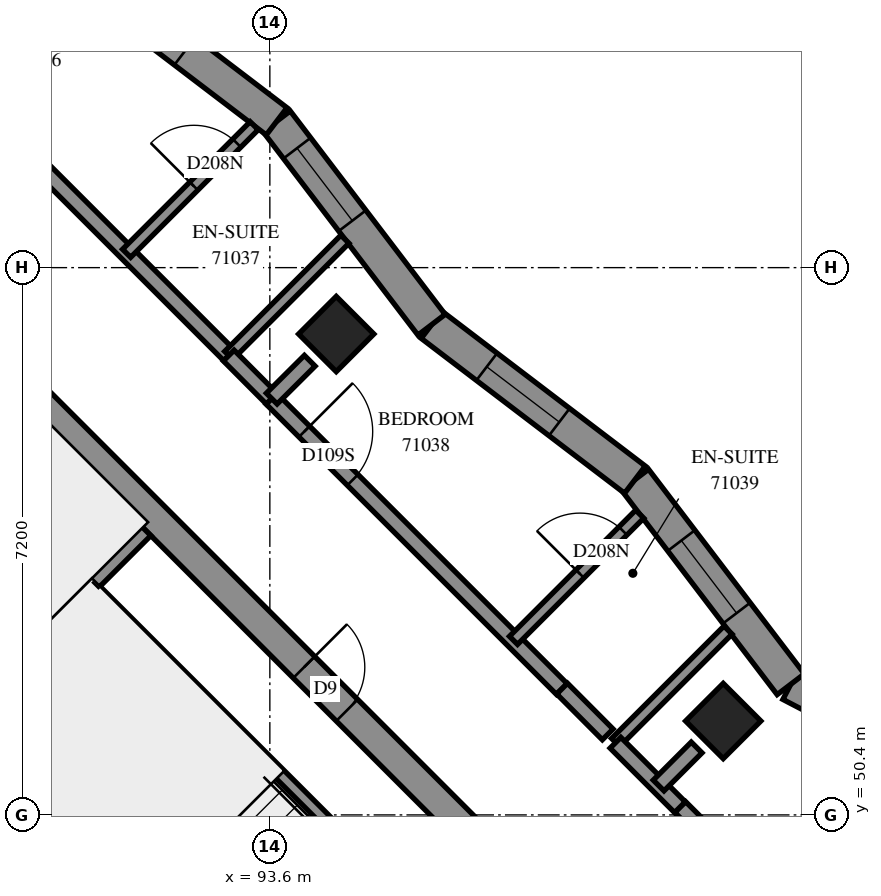
"""IFC4 building model, lengths in metres.
Left out: names, types, materials, properties, quantities, classifications, styles, units other than length and angle.
Written with IfcOpenShell. Run it as: python <this file> out.ifc"""

import sys

from ifc_helpers import new_model, si_unit, direction, frame, frame_2d, origin, origin_2d, place, context, subcontext, project, spatial, polyline, rectangle, outline, extrude, element, fill, save


model = new_model("IFC4")
c1 = context("Model", 3, precision=1e-05, world=origin(), true_north=direction((0.0, 1.0)))
c2 = subcontext(c1, "Body", "Model", "MODEL_VIEW")
j1 = project(units=[si_unit("LENGTHUNIT", "METRE"), si_unit("PLANEANGLEUNIT", "RADIAN")], contexts=[c1])
p1 = place(None, origin())
s1 = spatial("IfcSite", under=j1, at=p1, CompositionType="ELEMENT")
p2 = place(p1, origin())
s2 = spatial("IfcBuilding", under=s1, at=p2, CompositionType="ELEMENT")
p3 = place(p2, frame((0.0, 0.0, 260.8)))
s3 = spatial("IfcBuildingStorey", under=s2, at=p3, CompositionType="ELEMENT", Elevation=260.8)
for number, where, z_axis, x_axis in (
    (1, (94.474, 56.727, 0.0), (0.0, 0.0, 1.0), (0.707, -0.707, 0.0)),
    (2, (99.565, 51.635, 0.0), (0.0, 0.0, 1.0), (0.707, -0.707, 0.0)),
):
    element("IfcColumn", number, at=place(p3, frame(where, z_axis=z_axis, x_axis=x_axis)), inside=s3, PredefinedType="COLUMN", context=c2, shape_type="SweptSolid", body=[
        extrude(rectangle(XDim=0.7, YDim=0.7, at=origin_2d()), origin(), (0.0, 0.0, 1.0), 3.1),
    ])
p4 = place(p3, frame((86.695, 59.696, -0.3), z_axis=(0.0, 0.0, 1.0), x_axis=(0.7071100706, -0.7071034917, 0.0)))
e3 = element("IfcWall", 3, at=p4, inside=s3, PredefinedType="SHEAR", context=c2, shape_type="SweptSolid", body=[
    extrude(rectangle(XDim=15.2, YDim=0.4, at=frame_2d((7.6, 0.0))), origin(), (0.0, 0.0, 1.0), 2.7),
])
p5 = place(p4, frame((10.4, 0.0, 0.3)))
e4 = element("IfcOpeningElement", 4, at=p5, cuts=e3, PredefinedType="OPENING", context=c2, shape_type="SweptSolid", body=[
    extrude(rectangle(XDim=0.8, YDim=2.1, at=frame_2d((0.4, 1.05))), frame((0.0, 0.21, 0.0), z_axis=(0.0, -1.0, 0.0), x_axis=(1.0, 0.0, 0.0)), (0.0, 0.0, 1.0), 0.42),
])
p6 = place(p3, frame((81.534, 53.969, 0.0), z_axis=(0.0, 0.0, 1.0), x_axis=(0.707103309, -0.7071102534, 0.0)))
e5 = element("IfcWall", 5, at=p6, inside=s3, PredefinedType="SOLIDWALL", context=c2, shape_type="SweptSolid", body=[
    extrude(rectangle(XDim=14.4, YDim=0.3, at=frame_2d((7.2, 0.0))), origin(), (0.0, 0.0, 1.0), 3.1),
])
p7 = place(p6, frame((8.55, 0.0, 0.0)))
e6 = element("IfcOpeningElement", 6, at=p7, cuts=e5, PredefinedType="OPENING", context=c2, shape_type="SweptSolid", body=[
    extrude(rectangle(XDim=0.9, YDim=2.1, at=frame_2d((0.45, 1.05))), frame((0.0, 0.16, 0.0), z_axis=(0.0, -1.0, 0.0), x_axis=(1.0, 0.0, 0.0)), (0.0, 0.0, 1.0), 0.32),
])
p8 = place(p6, frame((1.25, 0.0, 0.0)))
e7 = element("IfcOpeningElement", 7, at=p8, cuts=e5, PredefinedType="OPENING", context=c2, shape_type="SweptSolid", body=[
    extrude(rectangle(XDim=1.1, YDim=2.1, at=frame_2d((0.55, 1.05))), frame((0.0, 0.16, 0.0), z_axis=(0.0, -1.0, 0.0), x_axis=(1.0, 0.0, 0.0)), (0.0, 0.0, 1.0), 0.32),
])
p9 = place(p6, frame((4.85, 0.0, 0.0)))
e8 = element("IfcOpeningElement", 8, at=p9, cuts=e5, PredefinedType="OPENING", context=c2, shape_type="SweptSolid", body=[
    extrude(rectangle(XDim=1.1, YDim=2.1, at=frame_2d((0.55, 1.05))), frame((0.0, 0.16, 0.0), z_axis=(0.0, -1.0, 0.0), x_axis=(1.0, 0.0, 0.0)), (0.0, 0.0, 1.0), 0.32),
])
p10 = place(p6, frame((12.05, 0.0, 0.0)))
e9 = element("IfcOpeningElement", 9, at=p10, cuts=e5, PredefinedType="OPENING", context=c2, shape_type="SweptSolid", body=[
    extrude(rectangle(XDim=1.1, YDim=2.1, at=frame_2d((0.55, 1.05))), frame((0.0, 0.16, 0.0), z_axis=(0.0, -1.0, 0.0), x_axis=(1.0, 0.0, 0.0)), (0.0, 0.0, 1.0), 0.32),
])
p11 = place(p3, frame((88.958, 51.211, 0.0), z_axis=(0.0, 0.0, 1.0), x_axis=(0.7070998367, -0.7071137256, 0.0)))
e10 = element("IfcWall", 10, at=p11, inside=s3, PredefinedType="SOLIDWALL", context=c2, shape_type="SweptSolid", body=[
    extrude(rectangle(XDim=7.2, YDim=0.3, at=frame_2d((3.6, 0.0))), origin(), (0.0, 0.0, 1.0), 3.1),
])
p12 = place(p3, frame((88.958, 51.211, 0.0), z_axis=(0.0, 0.0, 1.0), x_axis=(0.7071067812, 0.7071067812, 0.0)))
e11 = element("IfcWall", 11, at=p12, inside=s3, PredefinedType="SOLIDWALL", context=c2, shape_type="SweptSolid", body=[
    extrude(rectangle(XDim=4.2, YDim=0.3, at=frame_2d((2.1, 0.0))), origin(), (0.0, 0.0, 1.0), 3.1),
])
p13 = place(p3, frame((99.246, 46.544, 0.0), z_axis=(0.0, 0.0, 1.0), x_axis=(0.7071067812, 0.7071067812, 0.0)))
e12 = element("IfcWall", 12, at=p13, inside=s3, PredefinedType="SOLIDWALL", context=c2, shape_type="SweptSolid", body=[
    extrude(outline(polyline([(0.225, -0.225), (6.076, -0.225), (5.462, 0.225), (-0.225, 0.225), (0.225, -0.225)])), origin(), (0.0, 0.0, 1.0), 3.1),
])
p14 = place(p13, frame((0.713, 0.0, 0.6)))
e13 = element("IfcOpeningElement", 13, at=p14, cuts=e12, PredefinedType="OPENING", context=c2, shape_type="SweptSolid", body=[
    extrude(rectangle(XDim=1.8, YDim=1.9, at=frame_2d((0.9, 0.95))), frame((0.0, 0.235, 0.0), z_axis=(0.0, -1.0, 0.0), x_axis=(1.0, 0.0, 0.0)), (0.0, 0.0, 1.0), 0.47),
])
p15 = place(p13, frame((3.944, 0.0, 0.6)))
e14 = element("IfcOpeningElement", 14, at=p15, cuts=e12, PredefinedType="OPENING", context=c2, shape_type="SweptSolid", body=[
    extrude(rectangle(XDim=1.2, YDim=1.9, at=frame_2d((0.6, 0.95))), frame((0.0, 0.235, 0.0), z_axis=(0.0, -1.0, 0.0), x_axis=(1.0, 0.0, 0.0)), (0.0, 0.0, 1.0), 0.47),
])
p16 = place(p3, frame((103.326, 50.624, 0.0), z_axis=(0.0, 0.0, 1.0), x_axis=(-0.8870210657, 0.4617289562, 0.0)))
e15 = element("IfcWall", 15, at=p16, inside=s3, PredefinedType="SOLIDWALL", context=c2, shape_type="SweptSolid", body=[
    extrude(outline(polyline([(-0.307, -0.225), (3.188, -0.225), (3.289, 0.225), (0.307, 0.225), (-0.307, -0.225)])), origin(), (0.0, 0.0, 1.0), 3.1),
])
p17 = place(p16, frame((1.173, 0.0, 0.45)))
e16 = element("IfcOpeningElement", 16, at=p17, cuts=e15, PredefinedType="OPENING", context=c2, shape_type="SweptSolid", body=[
    extrude(rectangle(XDim=1.2, YDim=2.55, at=frame_2d((0.6, 1.275))), frame((0.0, 0.235, 0.0), z_axis=(0.0, -1.0, 0.0), x_axis=(1.0, 0.0, 0.0)), (0.0, 0.0, 1.0), 0.47),
])
p18 = place(p3, frame((100.453, 52.119, 0.0), z_axis=(0.0, 0.0, 1.0), x_axis=(-0.6058900407, 0.7955484012, 0.0)))
e17 = element("IfcWall", 17, at=p18, inside=s3, PredefinedType="SOLIDWALL", context=c2, shape_type="SweptSolid", body=[
    extrude(outline(polyline([(0.05, -0.225), (3.414, -0.225), (3.353, 0.225), (-0.05, 0.225), (0.05, -0.225)])), origin(), (0.0, 0.0, 1.0), 3.1),
])
p19 = place(p18, frame((1.177, 0.0, 0.45)))
e18 = element("IfcOpeningElement", 18, at=p19, cuts=e17, PredefinedType="OPENING", context=c2, shape_type="SweptSolid", body=[
    extrude(rectangle(XDim=1.2, YDim=2.55, at=frame_2d((0.6, 1.275))), frame((0.0, 0.235, 0.0), z_axis=(0.0, -1.0, 0.0), x_axis=(1.0, 0.0, 0.0)), (0.0, 0.0, 1.0), 0.47),
])
p20 = place(p3, frame((98.403, 54.811, 0.0), z_axis=(0.0, 0.0, 1.0), x_axis=(-0.795543631, 0.605896304, 0.0)))
e19 = element("IfcWall", 19, at=p20, inside=s3, PredefinedType="SOLIDWALL", context=c2, shape_type="SweptSolid", body=[
    extrude(outline(polyline([(-0.03, -0.225), (3.333, -0.225), (3.394, 0.225), (0.03, 0.225), (-0.03, -0.225)])), origin(), (0.0, 0.0, 1.0), 3.1),
])
p21 = place(p20, frame((1.251, 0.0, 0.45)))
e20 = element("IfcOpeningElement", 20, at=p21, cuts=e19, PredefinedType="OPENING", context=c2, shape_type="SweptSolid", body=[
    extrude(rectangle(XDim=1.2, YDim=2.55, at=frame_2d((0.6, 1.275))), frame((0.0, 0.235, 0.0), z_axis=(0.0, -1.0, 0.0), x_axis=(1.0, 0.0, 0.0)), (0.0, 0.0, 1.0), 0.47),
])
p22 = place(p3, frame((95.727, 56.849, 0.0), z_axis=(0.0, 0.0, 1.0), x_axis=(-0.6059151193, 0.7955293007, 0.0)))
e21 = element("IfcWall", 21, at=p22, inside=s3, PredefinedType="SOLIDWALL", context=c2, shape_type="SweptSolid", body=[
    extrude(outline(polyline([(0.03, -0.225), (3.394, -0.225), (3.333, 0.225), (-0.03, 0.225), (0.03, -0.225)])), origin(), (0.0, 0.0, 1.0), 3.1),
])
p23 = place(p22, frame((1.72, 0.0, 0.45)))
e22 = element("IfcOpeningElement", 22, at=p23, cuts=e21, PredefinedType="OPENING", context=c2, shape_type="SweptSolid", body=[
    extrude(rectangle(XDim=1.2, YDim=2.55, at=frame_2d((0.6, 1.275))), frame((0.0, 0.235, 0.0), z_axis=(0.0, -1.0, 0.0), x_axis=(1.0, 0.0, 0.0)), (0.0, 0.0, 1.0), 0.47),
])
p24 = place(p3, frame((93.689, 59.525, 0.0), z_axis=(0.0, 0.0, 1.0), x_axis=(-0.7955327164, 0.6059106346, 0.0)))
e23 = element("IfcWall", 23, at=p24, inside=s3, PredefinedType="SOLIDWALL", context=c2, shape_type="SweptSolid", body=[
    extrude(outline(polyline([(-0.03, -0.225), (3.333, -0.225), (3.394, 0.225), (0.03, 0.225), (-0.03, -0.225)])), origin(), (0.0, 0.0, 1.0), 3.1),
])
p25 = place(p24, frame((1.52, 0.0, 0.45)))
e24 = element("IfcOpeningElement", 24, at=p25, cuts=e23, PredefinedType="OPENING", context=c2, shape_type="SweptSolid", body=[
    extrude(rectangle(XDim=1.2, YDim=2.55, at=frame_2d((0.6, 1.275))), frame((0.0, 0.235, 0.0), z_axis=(0.0, -1.0, 0.0), x_axis=(1.0, 0.0, 0.0)), (0.0, 0.0, 1.0), 0.47),
])
p26 = place(p3, frame((91.313, 53.354, 0.0), z_axis=(0.0, 0.0, 1.0), x_axis=(0.7071140275, -0.7070995348, 0.0)))
e25 = element("IfcWall", 25, at=p26, inside=s3, PredefinedType="PARTITIONING", context=c2, shape_type="SweptSolid", body=[
    extrude(rectangle(XDim=6.9, YDim=0.15, at=frame_2d((3.45, 0.0))), origin(), (0.0, 0.0, 1.0), 3.1),
])
p27 = place(p3, frame((88.537, 60.973, 0.0), z_axis=(0.0, 0.0, 1.0), x_axis=(0.7071067812, -0.7071067812, 0.0)))
e26 = element("IfcWall", 26, at=p27, inside=s3, PredefinedType="PARTITIONING", context=c2, shape_type="SweptSolid", body=[
    extrude(rectangle(XDim=6.401, YDim=0.2, at=frame_2d((3.2, 0.0))), origin(), (0.0, 0.0, 1.0), 3.1),
])
p28 = place(p27, frame((0.569, 0.0, 0.0)))
e27 = element("IfcOpeningElement", 27, at=p28, cuts=e26, PredefinedType="OPENING", context=c2, shape_type="SweptSolid", body=[
    extrude(rectangle(XDim=0.9, YDim=2.1, at=frame_2d((0.45, 1.05))), frame((0.0, 0.11, 0.0), z_axis=(0.0, -1.0, 0.0), x_axis=(1.0, 0.0, 0.0)), (0.0, 0.0, 1.0), 0.22),
])
p29 = place(p3, frame((93.621, 55.875, 0.0), z_axis=(0.0, 0.0, 1.0), x_axis=(0.7071623255, -0.7070512325, 0.0)))
e28 = element("IfcWall", 28, at=p29, inside=s3, PredefinedType="PARTITIONING", context=c2, shape_type="SweptSolid", body=[
    extrude(rectangle(XDim=5.401, YDim=0.2, at=frame_2d((2.7, 0.0))), origin(), (0.0, 0.0, 1.0), 3.1),
])
p30 = place(p29, frame((0.611, 0.0, 0.0)))
e29 = element("IfcOpeningElement", 29, at=p30, cuts=e28, PredefinedType="OPENING", context=c2, shape_type="SweptSolid", body=[
    extrude(rectangle(XDim=0.9, YDim=2.1, at=frame_2d((0.45, 1.05))), frame((0.0, 0.11, 0.0), z_axis=(0.0, -1.0, 0.0), x_axis=(1.0, 0.0, 0.0)), (0.0, 0.0, 1.0), 0.22),
])
p31 = place(p3, frame((91.716, 57.788, 0.0), z_axis=(0.0, 0.0, 1.0), x_axis=(0.7071067812, 0.7071067812, 0.0)))
e30 = element("IfcWall", 30, at=p31, inside=s3, PredefinedType="PARTITIONING", context=c2, shape_type="SweptSolid", body=[
    extrude(rectangle(XDim=2.373, YDim=0.15, at=frame_2d((1.187, 0.0))), origin(), (0.0, 0.0, 1.0), 3.1),
])
p32 = place(p31, frame((1.25, 0.0, 0.0)))
e31 = element("IfcOpeningElement", 31, at=p32, cuts=e30, PredefinedType="OPENING", context=c2, shape_type="SweptSolid", body=[
    extrude(rectangle(XDim=0.8, YDim=2.1, at=frame_2d((0.4, 1.05))), frame((0.0, 0.085, 0.0), z_axis=(0.0, -1.0, 0.0), x_axis=(1.0, 0.0, 0.0)), (0.0, 0.0, 1.0), 0.17),
])
p33 = place(p3, frame((96.806, 52.696, 0.0), z_axis=(0.0, 0.0, 1.0), x_axis=(0.7071067812, 0.7071067812, 0.0)))
e32 = element("IfcWall", 32, at=p33, inside=s3, PredefinedType="PARTITIONING", context=c2, shape_type="SweptSolid", body=[
    extrude(rectangle(XDim=2.348, YDim=0.15, at=frame_2d((1.174, 0.0))), origin(), (0.0, 0.0, 1.0), 3.1),
])
p34 = place(p33, frame((1.236, 0.0, 0.0)))
e33 = element("IfcOpeningElement", 33, at=p34, cuts=e32, PredefinedType="OPENING", context=c2, shape_type="SweptSolid", body=[
    extrude(rectangle(XDim=0.8, YDim=2.1, at=frame_2d((0.4, 1.05))), frame((0.0, 0.085, 0.0), z_axis=(0.0, -1.0, 0.0), x_axis=(1.0, 0.0, 0.0)), (0.0, 0.0, 1.0), 0.17),
])
p35 = place(p3, frame((93.059, 56.445, 0.0), z_axis=(0.0, 0.0, 1.0), x_axis=(0.7071067812, 0.7071067812, 0.0)))
e34 = element("IfcWall", 34, at=p35, inside=s3, PredefinedType="PARTITIONING", context=c2, shape_type="SweptSolid", body=[
    extrude(rectangle(XDim=2.162, YDim=0.15, at=frame_2d((1.081, 0.0))), origin(), (0.0, 0.0, 1.0), 3.1),
])
p36 = place(p3, frame((98.149, 51.353, 0.0), z_axis=(0.0, 0.0, 1.0), x_axis=(0.7070828702, 0.7071306913, 0.0)))
e35 = element("IfcWall", 35, at=p36, inside=s3, PredefinedType="PARTITIONING", context=c2, shape_type="SweptSolid", body=[
    extrude(rectangle(XDim=2.091, YDim=0.15, at=frame_2d((1.046, 0.0))), origin(), (0.0, 0.0, 1.0), 3.1),
])
p37 = place(p3, frame((98.998, 50.504, 0.0), z_axis=(0.0, 0.0, 1.0), x_axis=(0.7076063266, -0.7066068826, 0.0)))
e36 = element("IfcWall", 36, at=p37, inside=s3, PredefinedType="PARTITIONING", context=c2, shape_type="SweptSolid", body=[
    extrude(rectangle(XDim=2.001, YDim=0.2, at=frame_2d((1.001, 0.0))), origin(), (0.0, 0.0, 1.0), 3.1),
])
p38 = place(p3, frame((98.147, 51.349, 0.0), z_axis=(0.0, 0.0, 1.0), x_axis=(0.7071067812, -0.7071067812, 0.0)))
e37 = element("IfcWall", 37, at=p38, inside=s3, PredefinedType="PARTITIONING", context=c2, shape_type="SweptSolid", body=[
    extrude(rectangle(XDim=1.199, YDim=0.2, at=frame_2d((0.6, 0.0))), origin(), (0.0, 0.0, 1.0), 3.1),
])
p39 = place(p3, frame((97.445, 52.061, 0.0), z_axis=(0.0, 0.0, 1.0), x_axis=(0.7059292536, -0.7082823511, 0.0)))
e38 = element("IfcWall", 38, at=p39, inside=s3, PredefinedType="PARTITIONING", context=c2, shape_type="SweptSolid", body=[
    extrude(rectangle(XDim=0.85, YDim=0.2, at=frame_2d((0.425, 0.0))), origin(), (0.0, 0.0, 1.0), 3.1),
])
p40 = place(p3, frame((93.059, 56.443, 0.0), z_axis=(0.0, 0.0, 1.0), x_axis=(0.7058541592, -0.7083571881, 0.0)))
e39 = element("IfcWall", 39, at=p40, inside=s3, PredefinedType="PARTITIONING", context=c2, shape_type="SweptSolid", body=[
    extrude(rectangle(XDim=0.799, YDim=0.2, at=frame_2d((0.4, 0.0))), origin(), (0.0, 0.0, 1.0), 3.1),
])
p41 = place(p3, frame((98.715, 50.787, 0.0), z_axis=(0.0, 0.0, 1.0), x_axis=(0.7071067812, 0.7071067812, 0.0)))
e40 = element("IfcWall", 40, at=p41, inside=s3, PredefinedType="PARTITIONING", context=c2, shape_type="SweptSolid", body=[
    extrude(rectangle(XDim=0.707, YDim=0.2, at=frame_2d((0.353, 0.0))), origin(), (0.0, 0.0, 1.0), 3.1),
])
p42 = place(p3, frame((93.625, 55.877, 0.0), z_axis=(0.0, 0.0, 1.0), x_axis=(0.7085224061, 0.7056883165, 0.0)))
e41 = element("IfcWall", 41, at=p42, inside=s3, PredefinedType="PARTITIONING", context=c2, shape_type="SweptSolid", body=[
    extrude(rectangle(XDim=0.706, YDim=0.2, at=frame_2d((0.353, 0.0))), origin(), (0.0, 0.0, 1.0), 3.1),
])
p43 = place(p19, origin())
e42 = element("IfcWindow", 42, at=p43, inside=s3, PartitioningType="SINGLE_PANEL", PredefinedType="WINDOW", context=c2, shape_type="SweptSolid", body=[
    extrude(rectangle(XDim=1.2, YDim=2.55, at=frame_2d((0.6, 1.275))), frame((0.0, 0.205, 0.0), z_axis=(0.0, -1.0, 0.0), x_axis=(1.0, 0.0, 0.0)), (0.0, 0.0, 1.0), 0.06),
])
fill(e18, e42)
p44 = place(p21, origin())
e43 = element("IfcWindow", 43, at=p44, inside=s3, PartitioningType="SINGLE_PANEL", PredefinedType="WINDOW", context=c2, shape_type="SweptSolid", body=[
    extrude(rectangle(XDim=1.2, YDim=2.55, at=frame_2d((0.6, 1.275))), frame((0.0, 0.205, 0.0), z_axis=(0.0, -1.0, 0.0), x_axis=(1.0, 0.0, 0.0)), (0.0, 0.0, 1.0), 0.06),
])
fill(e20, e43)
p45 = place(p23, origin())
e44 = element("IfcWindow", 44, at=p45, inside=s3, PartitioningType="SINGLE_PANEL", PredefinedType="WINDOW", context=c2, shape_type="SweptSolid", body=[
    extrude(rectangle(XDim=1.2, YDim=2.55, at=frame_2d((0.6, 1.275))), frame((0.0, 0.205, 0.0), z_axis=(0.0, -1.0, 0.0), x_axis=(1.0, 0.0, 0.0)), (0.0, 0.0, 1.0), 0.06),
])
fill(e22, e44)
p46 = place(p25, origin())
e45 = element("IfcWindow", 45, at=p46, inside=s3, PartitioningType="SINGLE_PANEL", PredefinedType="WINDOW", context=c2, shape_type="SweptSolid", body=[
    extrude(rectangle(XDim=1.2, YDim=2.55, at=frame_2d((0.6, 1.275))), frame((0.0, 0.205, 0.0), z_axis=(0.0, -1.0, 0.0), x_axis=(1.0, 0.0, 0.0)), (0.0, 0.0, 1.0), 0.06),
])
fill(e24, e45)
p47 = place(p5, origin())
e46 = element("IfcDoor", 46, at=p47, inside=s3, OperationType="SINGLE_SWING_RIGHT", PredefinedType="DOOR", context=c2, shape_type="SweptSolid", body=[
    extrude(rectangle(XDim=0.8, YDim=2.1, at=frame_2d((0.4, 1.05))), frame((0.0, 0.025, 0.0), z_axis=(0.0, -1.0, 0.0), x_axis=(1.0, 0.0, 0.0)), (0.0, 0.0, 1.0), 0.05),
])
fill(e4, e46)
p48 = place(p32, origin())
e47 = element("IfcDoor", 47, at=p48, inside=s3, OperationType="SINGLE_SWING_RIGHT", PredefinedType="DOOR", context=c2, shape_type="SweptSolid", body=[
    extrude(rectangle(XDim=0.8, YDim=2.1, at=frame_2d((0.4, 1.05))), frame((0.0, 0.025, 0.0), z_axis=(0.0, -1.0, 0.0), x_axis=(1.0, 0.0, 0.0)), (0.0, 0.0, 1.0), 0.05),
])
fill(e31, e47)
p49 = place(p30, origin())
e48 = element("IfcDoor", 48, at=p49, inside=s3, OperationType="SINGLE_SWING_LEFT", PredefinedType="DOOR", context=c2, shape_type="SweptSolid", body=[
    extrude(rectangle(XDim=0.9, YDim=2.1, at=frame_2d((0.45, 1.05))), frame((0.0, 0.025, 0.0), z_axis=(0.0, -1.0, 0.0), x_axis=(1.0, 0.0, 0.0)), (0.0, 0.0, 1.0), 0.05),
])
fill(e29, e48)
p50 = place(p34, origin())
e49 = element("IfcDoor", 49, at=p50, inside=s3, OperationType="SINGLE_SWING_RIGHT", PredefinedType="DOOR", context=c2, shape_type="SweptSolid", body=[
    extrude(rectangle(XDim=0.8, YDim=2.1, at=frame_2d((0.4, 1.05))), frame((0.0, 0.025, 0.0), z_axis=(0.0, -1.0, 0.0), x_axis=(1.0, 0.0, 0.0)), (0.0, 0.0, 1.0), 0.05),
])
fill(e33, e49)
save(model, sys.argv[1])
